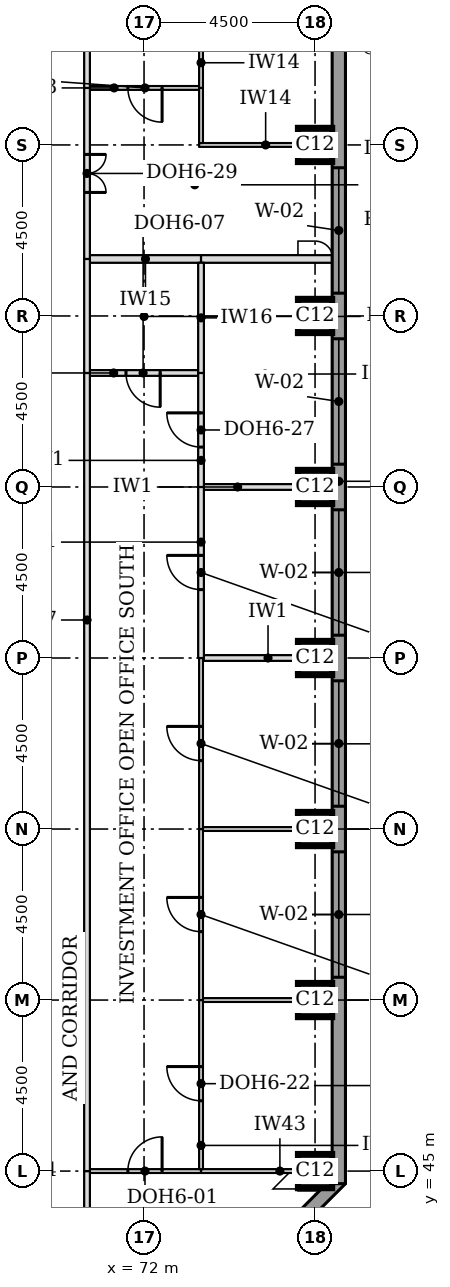
"""IFC4 building model, lengths in metres.
Left out: names, types, materials, properties, quantities, classifications, styles, units other than length and angle.
Written with IfcOpenShell. Run it as: python <this file> out.ifc"""

import sys

from ifc_helpers import new_model, si_unit, direction, frame, frame_2d, origin, origin_2d, place, context, subcontext, project, spatial, rectangle, extrude, element, fill, save


model = new_model("IFC4")
c1 = context("Model", 3, precision=1e-05, world=origin(), true_north=direction((0.0, 1.0)))
c2 = subcontext(c1, "Body", "Model", "MODEL_VIEW")
j1 = project(units=[si_unit("LENGTHUNIT", "METRE"), si_unit("PLANEANGLEUNIT", "RADIAN")], contexts=[c1])
p1 = place(None, origin())
s1 = spatial("IfcSite", under=j1, at=p1, CompositionType="ELEMENT")
p2 = place(p1, origin())
s2 = spatial("IfcBuilding", under=s1, at=p2, CompositionType="ELEMENT")
p3 = place(p2, frame((0.0, 0.0, 184.7)))
s3 = spatial("IfcBuildingStorey", under=s2, at=p3, CompositionType="ELEMENT", Elevation=184.7)
for number, where, z_axis, x_axis in (
    (1, (76.5, 45.0, 0.0), (0.0, 0.0, 1.0), (1.0, 0.0, 0.0)),
    (2, (76.5, 49.5, 0.0), (0.0, 0.0, 1.0), (1.0, 0.0, 0.0)),
    (3, (76.5, 54.0, 0.0), (0.0, 0.0, 1.0), (1.0, 0.0, 0.0)),
    (4, (76.5, 58.5, 0.0), (0.0, 0.0, 1.0), (1.0, 0.0, 0.0)),
    (5, (76.5, 63.0, 0.0), (0.0, 0.0, 1.0), (1.0, 0.0, 0.0)),
    (6, (76.5, 67.5, 0.0), (0.0, 0.0, 1.0), (1.0, 0.0, 0.0)),
    (7, (76.5, 72.0, 0.0), (0.0, 0.0, 1.0), (1.0, 0.0, 0.0)),
):
    element("IfcColumn", number, at=place(p3, frame(where, z_axis=z_axis, x_axis=x_axis)), inside=s3, PredefinedType="COLUMN", context=c2, shape_type="SweptSolid", body=[
        extrude(rectangle(XDim=0.9, YDim=0.9, at=origin_2d()), origin(), (0.0, 0.0, 1.0), 3.7),
    ])
p4 = place(p3, frame((72.208, 39.824, 0.0), z_axis=(0.0, 0.0, 1.0), x_axis=(0.707106781187, 0.707106781187, 0.0)))
e8 = element("IfcWall", 8, at=p4, inside=s3, PredefinedType="STANDARD", context=c2, shape_type="SweptSolid", body=[
    extrude(rectangle(XDim=7.027, YDim=0.35, at=frame_2d((3.513, 0.0))), origin(), (0.0, 0.0, 1.0), 3.525),
])
p5 = place(p4, frame((1.863, 0.0, 0.9)))
e9 = element("IfcOpeningElement", 9, at=p5, cuts=e8, PredefinedType="OPENING", context=c2, shape_type="SweptSolid", body=[
    extrude(rectangle(XDim=3.3, YDim=1.9, at=frame_2d((1.65, 0.95))), frame((0.0, 0.185, 0.0), z_axis=(0.0, -1.0, 0.0), x_axis=(1.0, 0.0, 0.0)), (0.0, 0.0, 1.0), 0.37),
])
p6 = place(p3, frame((77.125, 44.669, 0.0), z_axis=(0.0, 0.0, 1.0), x_axis=(0.0, 1.0, 0.0)))
e10 = element("IfcWall", 10, at=p6, inside=s3, PredefinedType="STANDARD", context=c2, shape_type="SweptSolid", body=[
    extrude(rectangle(XDim=32.163, YDim=0.35, at=frame_2d((16.081, 0.0))), origin(), (0.0, 0.0, 1.0), 3.525),
])
p7 = place(p6, frame((5.431, 0.0, 0.9)))
e11 = element("IfcOpeningElement", 11, at=p7, cuts=e10, PredefinedType="OPENING", context=c2, shape_type="SweptSolid", body=[
    extrude(rectangle(XDim=3.3, YDim=1.9, at=frame_2d((1.65, 0.95))), frame((0.0, 0.185, 0.0), z_axis=(0.0, -1.0, 0.0), x_axis=(1.0, 0.0, 0.0)), (0.0, 0.0, 1.0), 0.37),
])
p8 = place(p6, frame((9.931, 0.0, 0.9)))
e12 = element("IfcOpeningElement", 12, at=p8, cuts=e10, PredefinedType="OPENING", context=c2, shape_type="SweptSolid", body=[
    extrude(rectangle(XDim=3.3, YDim=1.9, at=frame_2d((1.65, 0.95))), frame((0.0, 0.185, 0.0), z_axis=(0.0, -1.0, 0.0), x_axis=(1.0, 0.0, 0.0)), (0.0, 0.0, 1.0), 0.37),
])
p9 = place(p6, frame((14.431, 0.0, 0.9)))
e13 = element("IfcOpeningElement", 13, at=p9, cuts=e10, PredefinedType="OPENING", context=c2, shape_type="SweptSolid", body=[
    extrude(rectangle(XDim=3.3, YDim=1.9, at=frame_2d((1.65, 0.95))), frame((0.0, 0.185, 0.0), z_axis=(0.0, -1.0, 0.0), x_axis=(1.0, 0.0, 0.0)), (0.0, 0.0, 1.0), 0.37),
])
p10 = place(p6, frame((18.931, 0.0, 0.9)))
e14 = element("IfcOpeningElement", 14, at=p10, cuts=e10, PredefinedType="OPENING", context=c2, shape_type="SweptSolid", body=[
    extrude(rectangle(XDim=3.3, YDim=1.9, at=frame_2d((1.65, 0.95))), frame((0.0, 0.185, 0.0), z_axis=(0.0, -1.0, 0.0), x_axis=(1.0, 0.0, 0.0)), (0.0, 0.0, 1.0), 0.37),
])
p11 = place(p6, frame((23.431, 0.0, 0.9)))
e15 = element("IfcOpeningElement", 15, at=p11, cuts=e10, PredefinedType="OPENING", context=c2, shape_type="SweptSolid", body=[
    extrude(rectangle(XDim=3.3, YDim=1.9, at=frame_2d((1.65, 0.95))), frame((0.0, 0.185, 0.0), z_axis=(0.0, -1.0, 0.0), x_axis=(1.0, 0.0, 0.0)), (0.0, 0.0, 1.0), 0.37),
])
p12 = place(p3, frame((70.575, 45.0, 0.0), z_axis=(0.0, 0.0, 1.0), x_axis=(1.0, 0.0, 0.0)))
e16 = element("IfcWall", 16, at=p12, inside=s3, PredefinedType="PARTITIONING", context=c2, shape_type="SweptSolid", body=[
    extrude(rectangle(XDim=2.925, YDim=0.1, at=frame_2d((1.462, 0.0))), origin(), (0.0, 0.0, 1.0), 3.096),
])
p13 = place(p12, frame((1.0, 0.0, 0.0)))
e17 = element("IfcOpeningElement", 17, at=p13, cuts=e16, PredefinedType="OPENING", context=c2, shape_type="SweptSolid", body=[
    extrude(rectangle(XDim=0.9, YDim=2.1, at=frame_2d((0.45, 1.05))), frame((0.0, 0.06, 0.0), z_axis=(0.0, -1.0, 0.0), x_axis=(1.0, 0.0, 0.0)), (0.0, 0.0, 1.0), 0.12),
])
p14 = place(p3, frame((73.5, 45.0, 0.0), z_axis=(0.0, 0.0, 1.0), x_axis=(1.0, 0.0, 0.0)))
e18 = element("IfcWall", 18, at=p14, inside=s3, PredefinedType="PARTITIONING", context=c2, shape_type="SweptSolid", body=[
    extrude(rectangle(XDim=2.55, YDim=0.1, at=frame_2d((1.275, 0.0))), origin(), (0.0, 0.0, 1.0), 3.096),
])
for number, where, z_axis, x_axis in (
    (19, (73.55, 49.5, 0.0), (0.0, 0.0, 1.0), (1.0, 0.0, 0.0)),
    (20, (73.55, 54.0, 0.0), (0.0, 0.0, 1.0), (1.0, 0.0, 0.0)),
):
    element("IfcWall", number, at=place(p3, frame(where, z_axis=z_axis, x_axis=x_axis)), inside=s3, PredefinedType="PARTITIONING", context=c2, shape_type="SweptSolid", body=[
        extrude(rectangle(XDim=3.4, YDim=0.1, at=frame_2d((1.7, 0.0))), origin(), (0.0, 0.0, 1.0), 3.55),
    ])
for number, where, z_axis, x_axis in (
    (21, (73.575, 58.5, 0.0), (0.0, 0.0, 1.0), (1.0, 0.0, 0.0)),
    (22, (73.575, 63.0, 0.0), (0.0, 0.0, 1.0), (1.0, 0.0, 0.0)),
):
    element("IfcWall", number, at=place(p3, frame(where, z_axis=z_axis, x_axis=x_axis)), inside=s3, PredefinedType="PARTITIONING", context=c2, shape_type="SweptSolid", body=[
        extrude(rectangle(XDim=3.375, YDim=0.15, at=frame_2d((1.688, 0.0))), origin(), (0.0, 0.0, 1.0), 3.55),
    ])
p15 = place(p3, frame((70.575, 66.0, 0.0), z_axis=(0.0, 0.0, 1.0), x_axis=(1.0, 0.0, 0.0)))
e23 = element("IfcWall", 23, at=p15, inside=s3, PredefinedType="PARTITIONING", context=c2, shape_type="SweptSolid", body=[
    extrude(rectangle(XDim=2.85, YDim=0.15, at=frame_2d((1.425, 0.0))), origin(), (0.0, 0.0, 1.0), 3.55),
])
p16 = place(p15, frame((0.95, 0.0, 0.0)))
e24 = element("IfcOpeningElement", 24, at=p16, cuts=e23, PredefinedType="OPENING", context=c2, shape_type="SweptSolid", body=[
    extrude(rectangle(XDim=0.9, YDim=2.1, at=frame_2d((0.45, 1.05))), frame((0.0, 0.085, 0.0), z_axis=(0.0, -1.0, 0.0), x_axis=(1.0, 0.0, 0.0)), (0.0, 0.0, 1.0), 0.17),
])
p17 = place(p3, frame((70.575, 69.0, 0.0), z_axis=(0.0, 0.0, 1.0), x_axis=(1.0, 0.0, 0.0)))
e25 = element("IfcWall", 25, at=p17, inside=s3, PredefinedType="PARTITIONING", context=c2, shape_type="SweptSolid", body=[
    extrude(rectangle(XDim=2.925, YDim=0.2, at=frame_2d((1.462, 0.0))), origin(), (0.0, 0.0, 1.0), 3.55),
])
p18 = place(p3, frame((73.5, 69.0, 0.0), z_axis=(0.0, 0.0, 1.0), x_axis=(1.0, 0.0, 0.0)))
e26 = element("IfcWall", 26, at=p18, inside=s3, PredefinedType="PARTITIONING", context=c2, shape_type="SweptSolid", body=[
    extrude(rectangle(XDim=3.45, YDim=0.2, at=frame_2d((1.725, 0.0))), origin(), (0.0, 0.0, 1.0), 3.55),
])
p19 = place(p3, frame((73.45, 72.0, 0.0), z_axis=(0.0, 0.0, 1.0), x_axis=(1.0, 0.0, 0.0)))
e27 = element("IfcWall", 27, at=p19, inside=s3, PredefinedType="PARTITIONING", context=c2, shape_type="SweptSolid", body=[
    extrude(rectangle(XDim=3.5, YDim=0.1, at=frame_2d((1.75, 0.0))), origin(), (0.0, 0.0, 1.0), 3.55),
])
p20 = place(p3, frame((70.575, 73.5, 0.0), z_axis=(0.0, 0.0, 1.0), x_axis=(1.0, 0.0, 0.0)))
e28 = element("IfcWall", 28, at=p20, inside=s3, PredefinedType="PARTITIONING", context=c2, shape_type="SweptSolid", body=[
    extrude(rectangle(XDim=2.875, YDim=0.1, at=frame_2d((1.438, 0.0))), origin(), (0.0, 0.0, 1.0), 3.096),
])
p21 = place(p20, frame((1.0, 0.0, 0.0)))
e29 = element("IfcOpeningElement", 29, at=p21, cuts=e28, PredefinedType="OPENING", context=c2, shape_type="SweptSolid", body=[
    extrude(rectangle(XDim=0.9, YDim=2.1, at=frame_2d((0.45, 1.05))), frame((0.0, 0.06, 0.0), z_axis=(0.0, -1.0, 0.0), x_axis=(1.0, 0.0, 0.0)), (0.0, 0.0, 1.0), 0.12),
])
p22 = place(p3, frame((70.5, 40.05, 0.0), z_axis=(0.0, 0.0, 1.0), x_axis=(0.0, 1.0, 0.0)))
e30 = element("IfcWall", 30, at=p22, inside=s3, PredefinedType="PARTITIONING", context=c2, shape_type="SweptSolid", body=[
    extrude(rectangle(XDim=4.95, YDim=0.15, at=frame_2d((2.475, 0.0))), origin(), (0.0, 0.0, 1.0), 3.55),
])
p23 = place(p22, frame((2.0, 0.0, 0.0)))
e31 = element("IfcOpeningElement", 31, at=p23, cuts=e30, PredefinedType="OPENING", context=c2, shape_type="SweptSolid", body=[
    extrude(rectangle(XDim=1.0, YDim=2.1, at=frame_2d((0.5, 1.05))), frame((0.0, 0.085, 0.0), z_axis=(0.0, -1.0, 0.0), x_axis=(1.0, 0.0, 0.0)), (0.0, 0.0, 1.0), 0.17),
])
p24 = place(p3, frame((70.5, 45.0, 0.0), z_axis=(0.0, 0.0, 1.0), x_axis=(0.0, 1.0, 0.0)))
e32 = element("IfcWall", 32, at=p24, inside=s3, PredefinedType="PARTITIONING", context=c2, shape_type="SweptSolid", body=[
    extrude(rectangle(XDim=21.0, YDim=0.15, at=frame_2d((10.5, 0.0))), origin(), (0.0, 0.0, 1.0), 3.55),
])
p25 = place(p3, frame((73.5, 45.05, 0.0), z_axis=(0.0, 0.0, 1.0), x_axis=(0.0, 1.0, 0.0)))
e33 = element("IfcWall", 33, at=p25, inside=s3, PredefinedType="PARTITIONING", context=c2, shape_type="SweptSolid", body=[
    extrude(rectangle(XDim=4.45, YDim=0.1, at=frame_2d((2.225, 0.0))), origin(), (0.0, 0.0, 1.0), 3.55),
])
p26 = place(p25, frame((1.8, 0.0, 0.0)))
e34 = element("IfcOpeningElement", 34, at=p26, cuts=e33, PredefinedType="OPENING", context=c2, shape_type="SweptSolid", body=[
    extrude(rectangle(XDim=0.9, YDim=2.1, at=frame_2d((0.45, 1.05))), frame((0.0, 0.06, 0.0), z_axis=(0.0, -1.0, 0.0), x_axis=(1.0, 0.0, 0.0)), (0.0, 0.0, 1.0), 0.12),
])
p27 = place(p3, frame((73.5, 49.5, 0.0), z_axis=(0.0, 0.0, 1.0), x_axis=(0.0, 1.0, 0.0)))
e35 = element("IfcWall", 35, at=p27, inside=s3, PredefinedType="PARTITIONING", context=c2, shape_type="SweptSolid", body=[
    extrude(rectangle(XDim=4.5, YDim=0.1, at=frame_2d((2.25, 0.0))), origin(), (0.0, 0.0, 1.0), 3.55),
])
p28 = place(p27, frame((1.8, 0.0, 0.0)))
e36 = element("IfcOpeningElement", 36, at=p28, cuts=e35, PredefinedType="OPENING", context=c2, shape_type="SweptSolid", body=[
    extrude(rectangle(XDim=0.9, YDim=2.1, at=frame_2d((0.45, 1.05))), frame((0.0, 0.06, 0.0), z_axis=(0.0, -1.0, 0.0), x_axis=(1.0, 0.0, 0.0)), (0.0, 0.0, 1.0), 0.12),
])
p29 = place(p3, frame((73.5, 54.0, 0.0), z_axis=(0.0, 0.0, 1.0), x_axis=(0.0, 1.0, 0.0)))
e37 = element("IfcWall", 37, at=p29, inside=s3, PredefinedType="PARTITIONING", context=c2, shape_type="SweptSolid", body=[
    extrude(rectangle(XDim=4.5, YDim=0.1, at=frame_2d((2.25, 0.0))), origin(), (0.0, 0.0, 1.0), 3.55),
])
p30 = place(p29, frame((1.8, 0.0, 0.0)))
e38 = element("IfcOpeningElement", 38, at=p30, cuts=e37, PredefinedType="OPENING", context=c2, shape_type="SweptSolid", body=[
    extrude(rectangle(XDim=0.9, YDim=2.1, at=frame_2d((0.45, 1.05))), frame((0.0, 0.06, 0.0), z_axis=(0.0, -1.0, 0.0), x_axis=(1.0, 0.0, 0.0)), (0.0, 0.0, 1.0), 0.12),
])
p31 = place(p3, frame((73.5, 58.5, 0.0), z_axis=(0.0, 0.0, 1.0), x_axis=(0.0, 1.0, 0.0)))
e39 = element("IfcWall", 39, at=p31, inside=s3, PredefinedType="PARTITIONING", context=c2, shape_type="SweptSolid", body=[
    extrude(rectangle(XDim=4.5, YDim=0.15, at=frame_2d((2.25, 0.0))), origin(), (0.0, 0.0, 1.0), 3.55),
])
p32 = place(p31, frame((1.8, 0.0, 0.0)))
e40 = element("IfcOpeningElement", 40, at=p32, cuts=e39, PredefinedType="OPENING", context=c2, shape_type="SweptSolid", body=[
    extrude(rectangle(XDim=0.9, YDim=2.1, at=frame_2d((0.45, 1.05))), frame((0.0, 0.085, 0.0), z_axis=(0.0, -1.0, 0.0), x_axis=(1.0, 0.0, 0.0)), (0.0, 0.0, 1.0), 0.17),
])
p33 = place(p3, frame((73.5, 63.0, 0.0), z_axis=(0.0, 0.0, 1.0), x_axis=(0.0, 1.0, 0.0)))
e41 = element("IfcWall", 41, at=p33, inside=s3, PredefinedType="PARTITIONING", context=c2, shape_type="SweptSolid", body=[
    extrude(rectangle(XDim=3.0, YDim=0.15, at=frame_2d((1.5, 0.0))), origin(), (0.0, 0.0, 1.0), 3.55),
])
p34 = place(p33, frame((1.05, 0.0, 0.0)))
e42 = element("IfcOpeningElement", 42, at=p34, cuts=e41, PredefinedType="OPENING", context=c2, shape_type="SweptSolid", body=[
    extrude(rectangle(XDim=0.9, YDim=2.1, at=frame_2d((0.45, 1.05))), frame((0.0, 0.085, 0.0), z_axis=(0.0, -1.0, 0.0), x_axis=(1.0, 0.0, 0.0)), (0.0, 0.0, 1.0), 0.17),
])
p35 = place(p3, frame((70.5, 66.0, 0.0), z_axis=(0.0, 0.0, 1.0), x_axis=(0.0, 1.0, 0.0)))
e43 = element("IfcWall", 43, at=p35, inside=s3, PredefinedType="PARTITIONING", context=c2, shape_type="SweptSolid", body=[
    extrude(rectangle(XDim=3.0, YDim=0.15, at=frame_2d((1.5, 0.0))), origin(), (0.0, 0.0, 1.0), 3.55),
])
p36 = place(p3, frame((73.5, 66.0, 0.0), z_axis=(0.0, 0.0, 1.0), x_axis=(0.0, 1.0, 0.0)))
e44 = element("IfcWall", 44, at=p36, inside=s3, PredefinedType="PARTITIONING", context=c2, shape_type="SweptSolid", body=[
    extrude(rectangle(XDim=2.9, YDim=0.15, at=frame_2d((1.45, 0.0))), origin(), (0.0, 0.0, 1.0), 3.55),
])
p37 = place(p3, frame((70.5, 69.0, 0.0), z_axis=(0.0, 0.0, 1.0), x_axis=(0.0, 1.0, 0.0)))
e45 = element("IfcWall", 45, at=p37, inside=s3, PredefinedType="PARTITIONING", context=c2, shape_type="SweptSolid", body=[
    extrude(rectangle(XDim=4.5, YDim=0.15, at=frame_2d((2.25, 0.0))), origin(), (0.0, 0.0, 1.0), 3.55),
])
p38 = place(p37, frame((1.75, 0.0, 0.0)))
e46 = element("IfcOpeningElement", 46, at=p38, cuts=e45, PredefinedType="OPENING", context=c2, shape_type="SweptSolid", body=[
    extrude(rectangle(XDim=1.0, YDim=2.1, at=frame_2d((0.5, 1.05))), frame((0.0, 0.085, 0.0), z_axis=(0.0, -1.0, 0.0), x_axis=(1.0, 0.0, 0.0)), (0.0, 0.0, 1.0), 0.17),
])
p39 = place(p3, frame((73.5, 72.05, 0.0), z_axis=(0.0, 0.0, 1.0), x_axis=(0.0, 1.0, 0.0)))
e47 = element("IfcWall", 47, at=p39, inside=s3, PredefinedType="PARTITIONING", context=c2, shape_type="SweptSolid", body=[
    extrude(rectangle(XDim=1.45, YDim=0.1, at=frame_2d((0.725, 0.0))), origin(), (0.0, 0.0, 1.0), 3.55),
])
p40 = place(p3, frame((70.5, 73.5, 0.0), z_axis=(0.0, 0.0, 1.0), x_axis=(0.0, 1.0, 0.0)))
e48 = element("IfcWall", 48, at=p40, inside=s3, PredefinedType="PARTITIONING", context=c2, shape_type="SweptSolid", body=[
    extrude(rectangle(XDim=3.0, YDim=0.15, at=frame_2d((1.5, 0.0))), origin(), (0.0, 0.0, 1.0), 3.55),
])
p41 = place(p3, frame((73.5, 73.5, 0.0), z_axis=(0.0, 0.0, 1.0), x_axis=(0.0, 1.0, 0.0)))
e49 = element("IfcWall", 49, at=p41, inside=s3, PredefinedType="PARTITIONING", context=c2, shape_type="SweptSolid", body=[
    extrude(rectangle(XDim=2.925, YDim=0.1, at=frame_2d((1.462, 0.0))), origin(), (0.0, 0.0, 1.0), 3.55),
])
p42 = place(p41, frame((1.0, 0.0, 0.0)))
e50 = element("IfcOpeningElement", 50, at=p42, cuts=e49, PredefinedType="OPENING", context=c2, shape_type="SweptSolid", body=[
    extrude(rectangle(XDim=0.9, YDim=2.1, at=frame_2d((0.45, 1.05))), frame((0.0, 0.06, 0.0), z_axis=(0.0, -1.0, 0.0), x_axis=(1.0, 0.0, 0.0)), (0.0, 0.0, 1.0), 0.12),
])
p43 = place(p7, origin())
e51 = element("IfcWindow", 51, at=p43, inside=s3, PartitioningType="SINGLE_PANEL", PredefinedType="WINDOW", context=c2, shape_type="SweptSolid", body=[
    extrude(rectangle(XDim=3.3, YDim=1.9, at=frame_2d((1.65, 0.95))), frame((0.0, 0.085, 0.0), z_axis=(0.0, -1.0, 0.0), x_axis=(1.0, 0.0, 0.0)), (0.0, 0.0, 1.0), 0.06),
])
fill(e11, e51)
p44 = place(p8, origin())
e52 = element("IfcWindow", 52, at=p44, inside=s3, PartitioningType="SINGLE_PANEL", PredefinedType="WINDOW", context=c2, shape_type="SweptSolid", body=[
    extrude(rectangle(XDim=3.3, YDim=1.9, at=frame_2d((1.65, 0.95))), frame((0.0, 0.085, 0.0), z_axis=(0.0, -1.0, 0.0), x_axis=(1.0, 0.0, 0.0)), (0.0, 0.0, 1.0), 0.06),
])
fill(e12, e52)
p45 = place(p9, origin())
e53 = element("IfcWindow", 53, at=p45, inside=s3, PartitioningType="SINGLE_PANEL", PredefinedType="WINDOW", context=c2, shape_type="SweptSolid", body=[
    extrude(rectangle(XDim=3.3, YDim=1.9, at=frame_2d((1.65, 0.95))), frame((0.0, 0.085, 0.0), z_axis=(0.0, -1.0, 0.0), x_axis=(1.0, 0.0, 0.0)), (0.0, 0.0, 1.0), 0.06),
])
fill(e13, e53)
p46 = place(p10, origin())
e54 = element("IfcWindow", 54, at=p46, inside=s3, PartitioningType="SINGLE_PANEL", PredefinedType="WINDOW", context=c2, shape_type="SweptSolid", body=[
    extrude(rectangle(XDim=3.3, YDim=1.9, at=frame_2d((1.65, 0.95))), frame((0.0, 0.085, 0.0), z_axis=(0.0, -1.0, 0.0), x_axis=(1.0, 0.0, 0.0)), (0.0, 0.0, 1.0), 0.06),
])
fill(e14, e54)
p47 = place(p11, origin())
e55 = element("IfcWindow", 55, at=p47, inside=s3, PartitioningType="SINGLE_PANEL", PredefinedType="WINDOW", context=c2, shape_type="SweptSolid", body=[
    extrude(rectangle(XDim=3.3, YDim=1.9, at=frame_2d((1.65, 0.95))), frame((0.0, 0.085, 0.0), z_axis=(0.0, -1.0, 0.0), x_axis=(1.0, 0.0, 0.0)), (0.0, 0.0, 1.0), 0.06),
])
fill(e15, e55)
p48 = place(p13, origin())
e56 = element("IfcDoor", 56, at=p48, inside=s3, OperationType="SINGLE_SWING_RIGHT", PredefinedType="DOOR", context=c2, shape_type="SweptSolid", body=[
    extrude(rectangle(XDim=0.9, YDim=2.1, at=frame_2d((0.45, 1.05))), frame((0.0, 0.025, 0.0), z_axis=(0.0, -1.0, 0.0), x_axis=(1.0, 0.0, 0.0)), (0.0, 0.0, 1.0), 0.05),
])
fill(e17, e56)
p49 = place(p26, origin())
e57 = element("IfcDoor", 57, at=p49, inside=s3, OperationType="SINGLE_SWING_RIGHT", PredefinedType="DOOR", context=c2, shape_type="SweptSolid", body=[
    extrude(rectangle(XDim=0.9, YDim=2.1, at=frame_2d((0.45, 1.05))), frame((0.0, 0.025, 0.0), z_axis=(0.0, -1.0, 0.0), x_axis=(1.0, 0.0, 0.0)), (0.0, 0.0, 1.0), 0.05),
])
fill(e34, e57)
p50 = place(p28, origin())
e58 = element("IfcDoor", 58, at=p50, inside=s3, OperationType="SINGLE_SWING_RIGHT", PredefinedType="DOOR", context=c2, shape_type="SweptSolid", body=[
    extrude(rectangle(XDim=0.9, YDim=2.1, at=frame_2d((0.45, 1.05))), frame((0.0, 0.025, 0.0), z_axis=(0.0, -1.0, 0.0), x_axis=(1.0, 0.0, 0.0)), (0.0, 0.0, 1.0), 0.05),
])
fill(e36, e58)
p51 = place(p30, origin())
e59 = element("IfcDoor", 59, at=p51, inside=s3, OperationType="SINGLE_SWING_RIGHT", PredefinedType="DOOR", context=c2, shape_type="SweptSolid", body=[
    extrude(rectangle(XDim=0.9, YDim=2.1, at=frame_2d((0.45, 1.05))), frame((0.0, 0.025, 0.0), z_axis=(0.0, -1.0, 0.0), x_axis=(1.0, 0.0, 0.0)), (0.0, 0.0, 1.0), 0.05),
])
fill(e38, e59)
p52 = place(p16, frame((0.9, 0.0, 0.0), z_axis=(0.0, 0.0, 1.0), x_axis=(-1.0, 0.0, 0.0)))
e60 = element("IfcDoor", 60, at=p52, inside=s3, OperationType="SINGLE_SWING_LEFT", PredefinedType="DOOR", context=c2, shape_type="SweptSolid", body=[
    extrude(rectangle(XDim=0.9, YDim=2.1, at=frame_2d((0.45, 1.05))), frame((0.0, 0.025, 0.0), z_axis=(0.0, -1.0, 0.0), x_axis=(1.0, 0.0, 0.0)), (0.0, 0.0, 1.0), 0.05),
])
fill(e24, e60)
p53 = place(p32, origin())
e61 = element("IfcDoor", 61, at=p53, inside=s3, OperationType="SINGLE_SWING_RIGHT", PredefinedType="DOOR", context=c2, shape_type="SweptSolid", body=[
    extrude(rectangle(XDim=0.9, YDim=2.1, at=frame_2d((0.45, 1.05))), frame((0.0, 0.025, 0.0), z_axis=(0.0, -1.0, 0.0), x_axis=(1.0, 0.0, 0.0)), (0.0, 0.0, 1.0), 0.05),
])
fill(e40, e61)
p54 = place(p34, origin())
e62 = element("IfcDoor", 62, at=p54, inside=s3, OperationType="SINGLE_SWING_RIGHT", PredefinedType="DOOR", context=c2, shape_type="SweptSolid", body=[
    extrude(rectangle(XDim=0.9, YDim=2.1, at=frame_2d((0.45, 1.05))), frame((0.0, 0.025, 0.0), z_axis=(0.0, -1.0, 0.0), x_axis=(1.0, 0.0, 0.0)), (0.0, 0.0, 1.0), 0.05),
])
fill(e42, e62)
p55 = place(p38, frame((1.0, 0.0, 0.0), z_axis=(0.0, 0.0, 1.0), x_axis=(-1.0, 0.0, 0.0)))
e63 = element("IfcDoor", 63, at=p55, inside=s3, OperationType="DOUBLE_DOOR_SINGLE_SWING", PredefinedType="DOOR", context=c2, shape_type="SweptSolid", body=[
    extrude(rectangle(XDim=1.0, YDim=2.1, at=frame_2d((0.5, 1.05))), frame((0.0, 0.025, 0.0), z_axis=(0.0, -1.0, 0.0), x_axis=(1.0, 0.0, 0.0)), (0.0, 0.0, 1.0), 0.05),
])
fill(e46, e63)
p56 = place(p21, frame((0.9, 0.0, 0.0), z_axis=(0.0, 0.0, 1.0), x_axis=(-1.0, 0.0, 0.0)))
e64 = element("IfcDoor", 64, at=p56, inside=s3, OperationType="SINGLE_SWING_LEFT", PredefinedType="DOOR", context=c2, shape_type="SweptSolid", body=[
    extrude(rectangle(XDim=0.9, YDim=2.1, at=frame_2d((0.45, 1.05))), frame((0.0, 0.025, 0.0), z_axis=(0.0, -1.0, 0.0), x_axis=(1.0, 0.0, 0.0)), (0.0, 0.0, 1.0), 0.05),
])
fill(e29, e64)
save(model, sys.argv[1])
